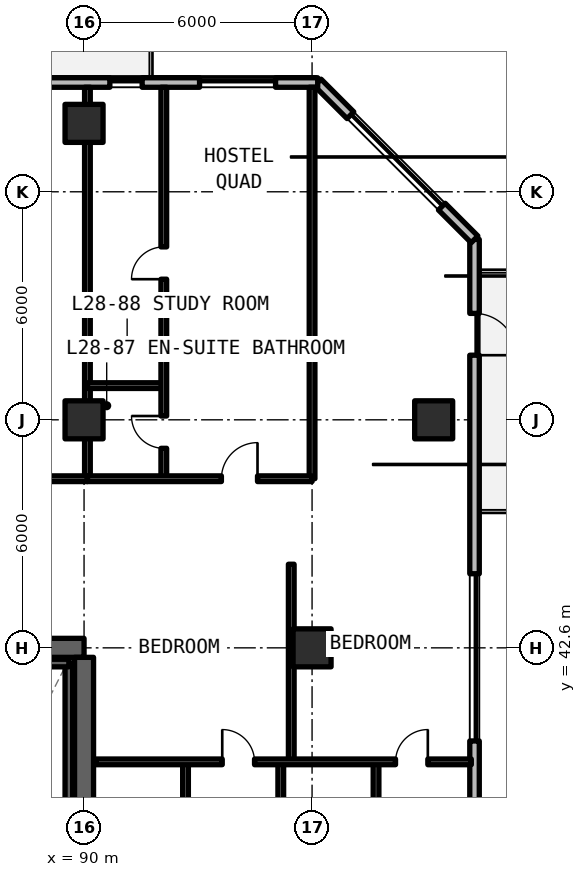
"""IFC4 building model, lengths in metres.
Left out: names, types, materials, properties, quantities, classifications, styles, units other than length and angle.
Written with IfcOpenShell. Run it as: python <this file> out.ifc"""

import sys

from ifc_helpers import new_model, si_unit, direction, frame, frame_2d, origin, origin_2d, place, context, subcontext, project, spatial, rectangle, extrude, element, fill, save


model = new_model("IFC4")
c1 = context("Model", 3, precision=1e-05, world=origin(), true_north=direction((0.0, 1.0)))
c2 = subcontext(c1, "Body", "Model", "MODEL_VIEW")
j1 = project(units=[si_unit("LENGTHUNIT", "METRE"), si_unit("PLANEANGLEUNIT", "RADIAN")], contexts=[c1])
p1 = place(None, origin())
s1 = spatial("IfcSite", under=j1, at=p1, CompositionType="ELEMENT")
p2 = place(p1, origin())
s2 = spatial("IfcBuilding", under=s1, at=p2, CompositionType="ELEMENT")
p3 = place(p2, frame((0.0, 0.0, 101.97)))
s3 = spatial("IfcBuildingStorey", under=s2, at=p3, CompositionType="ELEMENT", Elevation=101.97)
p4 = place(p3, frame((90.0, 42.6, 0.0), z_axis=(0.0, 0.0, 1.0), x_axis=(-1.0, 0.0, 0.0)))
e1 = element("IfcWall", 1, at=p4, inside=s3, PredefinedType="SHEAR", context=c2, shape_type="SweptSolid", body=[
    extrude(rectangle(XDim=12.0, YDim=0.5, at=frame_2d((6.0, 0.0))), origin(), (0.0, 0.0, 1.0), 3.3),
])
p5 = place(p3, frame((90.0, 24.85, 0.0), z_axis=(0.0, 0.0, 1.0), x_axis=(0.0, 1.0, 0.0)))
e2 = element("IfcWall", 2, at=p5, inside=s3, PredefinedType="SHEAR", context=c2, shape_type="SweptSolid", body=[
    extrude(rectangle(XDim=17.5, YDim=0.5, at=frame_2d((8.75, 0.0))), origin(), (0.0, 0.0, 1.0), 3.3),
])
for number, where, z_axis, x_axis in (
    (3, (96.0, 42.6, 0.0), (0.0, 0.0, 1.0), (1.0, 0.0, 0.0)),
    (4, (90.0, 48.6, 0.0), (0.0, 0.0, 1.0), (1.0, 0.0, 0.0)),
    (5, (99.2, 48.6, 0.0), (0.0, 0.0, 1.0), (1.0, 0.0, 0.0)),
    (6, (90.0, 56.4, 0.0), (0.0, 0.0, 1.0), (1.0, 0.0, 0.0)),
):
    element("IfcColumn", number, at=place(p3, frame(where, z_axis=z_axis, x_axis=x_axis)), inside=s3, PredefinedType="COLUMN", context=c2, shape_type="SweptSolid", body=[
        extrude(rectangle(XDim=1.0, YDim=1.0, at=origin_2d()), origin(), (0.0, 0.0, 1.0), 3.3),
    ])
p6 = place(p3, frame((100.275, 13.852, 0.0), z_axis=(0.0, 0.0, 1.0), x_axis=(0.0, 1.0, 0.0)))
e7 = element("IfcWall", 7, at=p6, inside=s3, PredefinedType="SOLIDWALL", context=c2, shape_type="SweptSolid", body=[
    extrude(rectangle(XDim=39.496, YDim=0.25, at=frame_2d((19.748, 0.0))), origin(), (0.0, 0.0, 1.0), 3.08),
])
p7 = place(p6, frame((1.948, 0.0, 0.0)))
e8 = element("IfcOpeningElement", 8, at=p7, cuts=e7, PredefinedType="OPENING", context=c2, shape_type="SweptSolid", body=[
    extrude(rectangle(XDim=1.1, YDim=2.15, at=frame_2d((0.55, 1.075))), frame((0.0, 0.135, 0.0), z_axis=(0.0, -1.0, 0.0), x_axis=(1.0, 0.0, 0.0)), (0.0, 0.0, 1.0), 0.27),
])
p8 = place(p6, frame((36.448, 0.0, 0.0)))
e9 = element("IfcOpeningElement", 9, at=p8, cuts=e7, PredefinedType="OPENING", context=c2, shape_type="SweptSolid", body=[
    extrude(rectangle(XDim=1.1, YDim=2.15, at=frame_2d((0.55, 1.075))), frame((0.0, 0.135, 0.0), z_axis=(0.0, -1.0, 0.0), x_axis=(1.0, 0.0, 0.0)), (0.0, 0.0, 1.0), 0.27),
])
p9 = place(p6, frame((14.958, 0.0, 0.78)))
e10 = element("IfcOpeningElement", 10, at=p9, cuts=e7, PredefinedType="OPENING", context=c2, shape_type="SweptSolid", body=[
    extrude(rectangle(XDim=4.4, YDim=1.66, at=frame_2d((2.2, 0.83))), frame((0.0, 0.135, 0.0), z_axis=(0.0, -1.0, 0.0), x_axis=(1.0, 0.0, 0.0)), (0.0, 0.0, 1.0), 0.27),
])
p10 = place(p6, frame((26.298, 0.0, 0.78)))
e11 = element("IfcOpeningElement", 11, at=p10, cuts=e7, PredefinedType="OPENING", context=c2, shape_type="SweptSolid", body=[
    extrude(rectangle(XDim=4.4, YDim=1.66, at=frame_2d((2.2, 0.83))), frame((0.0, 0.135, 0.0), z_axis=(0.0, -1.0, 0.0), x_axis=(1.0, 0.0, 0.0)), (0.0, 0.0, 1.0), 0.27),
])
p11 = place(p3, frame((100.275, 53.348, 0.0), z_axis=(0.0, 0.0, 1.0), x_axis=(-0.70708586489, 0.707127696864, 0.0)))
e12 = element("IfcWall", 12, at=p11, inside=s3, PredefinedType="SOLIDWALL", context=c2, shape_type="SweptSolid", body=[
    extrude(rectangle(XDim=5.836, YDim=0.25, at=frame_2d((2.918, 0.0))), origin(), (0.0, 0.0, 1.0), 3.08),
])
p12 = place(p11, frame((1.218, 0.0, 0.78)))
e13 = element("IfcOpeningElement", 13, at=p12, cuts=e12, PredefinedType="OPENING", context=c2, shape_type="SweptSolid", body=[
    extrude(rectangle(XDim=3.4, YDim=1.66, at=frame_2d((1.7, 0.83))), frame((0.0, 0.135, 0.0), z_axis=(0.0, -1.0, 0.0), x_axis=(1.0, 0.0, 0.0)), (0.0, 0.0, 1.0), 0.27),
])
p13 = place(p3, frame((96.148, 57.475, 0.0), z_axis=(0.0, 0.0, 1.0), x_axis=(-1.0, 0.0, 0.0)))
e14 = element("IfcWall", 14, at=p13, inside=s3, PredefinedType="SOLIDWALL", context=c2, shape_type="SweptSolid", body=[
    extrude(rectangle(XDim=44.023, YDim=0.25, at=frame_2d((22.012, 0.0))), origin(), (0.0, 0.0, 1.0), 3.08),
])
p14 = place(p13, frame((31.848, 0.0, 0.0)))
e15 = element("IfcOpeningElement", 15, at=p14, cuts=e14, PredefinedType="OPENING", context=c2, shape_type="SweptSolid", body=[
    extrude(rectangle(XDim=1.1, YDim=2.15, at=frame_2d((0.55, 1.075))), frame((0.0, 0.135, 0.0), z_axis=(0.0, -1.0, 0.0), x_axis=(1.0, 0.0, 0.0)), (0.0, 0.0, 1.0), 0.27),
])
p15 = place(p13, frame((19.998, 0.0, 0.0)))
e16 = element("IfcOpeningElement", 16, at=p15, cuts=e14, PredefinedType="OPENING", context=c2, shape_type="SweptSolid", body=[
    extrude(rectangle(XDim=1.1, YDim=2.15, at=frame_2d((0.55, 1.075))), frame((0.0, 0.135, 0.0), z_axis=(0.0, -1.0, 0.0), x_axis=(1.0, 0.0, 0.0)), (0.0, 0.0, 1.0), 0.27),
])
p16 = place(p13, frame((8.398, 0.0, 0.0)))
e17 = element("IfcOpeningElement", 17, at=p16, cuts=e14, PredefinedType="OPENING", context=c2, shape_type="SweptSolid", body=[
    extrude(rectangle(XDim=1.1, YDim=2.15, at=frame_2d((0.55, 1.075))), frame((0.0, 0.135, 0.0), z_axis=(0.0, -1.0, 0.0), x_axis=(1.0, 0.0, 0.0)), (0.0, 0.0, 1.0), 0.27),
])
p17 = place(p13, frame((39.277, 0.0, 0.78)))
e18 = element("IfcOpeningElement", 18, at=p17, cuts=e14, PredefinedType="OPENING", context=c2, shape_type="SweptSolid", body=[
    extrude(rectangle(XDim=2.0, YDim=1.66, at=frame_2d((1.0, 0.83))), frame((0.0, 0.135, 0.0), z_axis=(0.0, -1.0, 0.0), x_axis=(1.0, 0.0, 0.0)), (0.0, 0.0, 1.0), 0.27),
])
p18 = place(p13, frame((34.622, 0.0, 0.78)))
e19 = element("IfcOpeningElement", 19, at=p18, cuts=e14, PredefinedType="OPENING", context=c2, shape_type="SweptSolid", body=[
    extrude(rectangle(XDim=0.85, YDim=1.65, at=frame_2d((0.425, 0.825))), frame((0.0, 0.135, 0.0), z_axis=(0.0, -1.0, 0.0), x_axis=(1.0, 0.0, 0.0)), (0.0, 0.0, 1.0), 0.27),
])
p19 = place(p13, frame((26.431, 0.0, 0.78)))
e20 = element("IfcOpeningElement", 20, at=p19, cuts=e14, PredefinedType="OPENING", context=c2, shape_type="SweptSolid", body=[
    extrude(rectangle(XDim=2.0, YDim=1.66, at=frame_2d((1.0, 0.83))), frame((0.0, 0.135, 0.0), z_axis=(0.0, -1.0, 0.0), x_axis=(1.0, 0.0, 0.0)), (0.0, 0.0, 1.0), 0.27),
])
p20 = place(p13, frame((22.757, 0.0, 0.78)))
e21 = element("IfcOpeningElement", 21, at=p20, cuts=e14, PredefinedType="OPENING", context=c2, shape_type="SweptSolid", body=[
    extrude(rectangle(XDim=0.85, YDim=1.65, at=frame_2d((0.425, 0.825))), frame((0.0, 0.135, 0.0), z_axis=(0.0, -1.0, 0.0), x_axis=(1.0, 0.0, 0.0)), (0.0, 0.0, 1.0), 0.27),
])
p21 = place(p13, frame((16.669, 0.0, 0.78)))
e22 = element("IfcOpeningElement", 22, at=p21, cuts=e14, PredefinedType="OPENING", context=c2, shape_type="SweptSolid", body=[
    extrude(rectangle(XDim=0.85, YDim=1.65, at=frame_2d((0.425, 0.825))), frame((0.0, 0.135, 0.0), z_axis=(0.0, -1.0, 0.0), x_axis=(1.0, 0.0, 0.0)), (0.0, 0.0, 1.0), 0.27),
])
p22 = place(p13, frame((13.159, 0.0, 0.78)))
e23 = element("IfcOpeningElement", 23, at=p22, cuts=e14, PredefinedType="OPENING", context=c2, shape_type="SweptSolid", body=[
    extrude(rectangle(XDim=2.0, YDim=1.66, at=frame_2d((1.0, 0.83))), frame((0.0, 0.135, 0.0), z_axis=(0.0, -1.0, 0.0), x_axis=(1.0, 0.0, 0.0)), (0.0, 0.0, 1.0), 0.27),
])
p23 = place(p13, frame((10.56, 0.0, 0.78)))
e24 = element("IfcOpeningElement", 24, at=p23, cuts=e14, PredefinedType="OPENING", context=c2, shape_type="SweptSolid", body=[
    extrude(rectangle(XDim=0.85, YDim=1.65, at=frame_2d((0.425, 0.825))), frame((0.0, 0.135, 0.0), z_axis=(0.0, -1.0, 0.0), x_axis=(1.0, 0.0, 0.0)), (0.0, 0.0, 1.0), 0.27),
])
p24 = place(p13, frame((4.619, 0.0, 0.78)))
e25 = element("IfcOpeningElement", 25, at=p24, cuts=e14, PredefinedType="OPENING", context=c2, shape_type="SweptSolid", body=[
    extrude(rectangle(XDim=0.85, YDim=1.65, at=frame_2d((0.425, 0.825))), frame((0.0, 0.135, 0.0), z_axis=(0.0, -1.0, 0.0), x_axis=(1.0, 0.0, 0.0)), (0.0, 0.0, 1.0), 0.27),
])
p25 = place(p13, frame((1.109, 0.0, 0.78)))
e26 = element("IfcOpeningElement", 26, at=p25, cuts=e14, PredefinedType="OPENING", context=c2, shape_type="SweptSolid", body=[
    extrude(rectangle(XDim=2.0, YDim=1.66, at=frame_2d((1.0, 0.83))), frame((0.0, 0.135, 0.0), z_axis=(0.0, -1.0, 0.0), x_axis=(1.0, 0.0, 0.0)), (0.0, 0.0, 1.0), 0.27),
])
p26 = place(p3, frame((95.177, 22.4, 0.0), z_axis=(0.0, 0.0, 1.0), x_axis=(0.0, 1.0, 0.0)))
e27 = element("IfcWall", 27, at=p26, inside=s3, PredefinedType="PARTITIONING", context=c2, shape_type="SweptSolid", body=[
    extrude(rectangle(XDim=17.2, YDim=0.15, at=frame_2d((8.6, 0.0))), origin(), (0.0, 0.0, 1.0), 2.35),
])
p27 = place(p26, frame((8.175, 0.0, 0.0)))
e28 = element("IfcOpeningElement", 28, at=p27, cuts=e27, PredefinedType="OPENING", context=c2, shape_type="SweptSolid", body=[
    extrude(rectangle(XDim=0.85, YDim=2.1, at=frame_2d((0.425, 1.05))), frame((0.0, 0.085, 0.0), z_axis=(0.0, -1.0, 0.0), x_axis=(1.0, 0.0, 0.0)), (0.0, 0.0, 1.0), 0.17),
])
p28 = place(p3, frame((97.683, 22.4, 0.0), z_axis=(0.0, 0.0, 1.0), x_axis=(0.0, 1.0, 0.0)))
e29 = element("IfcWall", 29, at=p28, inside=s3, PredefinedType="PARTITIONING", context=c2, shape_type="SweptSolid", body=[
    extrude(rectangle(XDim=17.2, YDim=0.15, at=frame_2d((8.6, 0.0))), origin(), (0.0, 0.0, 1.0), 2.35),
])
p29 = place(p28, frame((8.175, 0.0, 0.0)))
e30 = element("IfcOpeningElement", 30, at=p29, cuts=e29, PredefinedType="OPENING", context=c2, shape_type="SweptSolid", body=[
    extrude(rectangle(XDim=0.85, YDim=2.1, at=frame_2d((0.425, 1.05))), frame((0.0, 0.085, 0.0), z_axis=(0.0, -1.0, 0.0), x_axis=(1.0, 0.0, 0.0)), (0.0, 0.0, 1.0), 0.17),
])
p30 = place(p3, frame((92.67, 22.4, 0.0), z_axis=(0.0, 0.0, 1.0), x_axis=(0.0, 1.0, 0.0)))
e31 = element("IfcWall", 31, at=p30, inside=s3, PredefinedType="PARTITIONING", context=c2, shape_type="SweptSolid", body=[
    extrude(rectangle(XDim=17.2, YDim=0.15, at=frame_2d((8.6, 0.0))), origin(), (0.0, 0.0, 1.0), 2.35),
])
p31 = place(p30, frame((4.649, 0.0, 0.0)))
e32 = element("IfcOpeningElement", 32, at=p31, cuts=e31, PredefinedType="OPENING", context=c2, shape_type="SweptSolid", body=[
    extrude(rectangle(XDim=0.85, YDim=2.1, at=frame_2d((0.425, 1.05))), frame((0.0, 0.085, 0.0), z_axis=(0.0, -1.0, 0.0), x_axis=(1.0, 0.0, 0.0)), (0.0, 0.0, 1.0), 0.17),
])
p32 = place(p30, frame((13.249, 0.0, 0.0)))
e33 = element("IfcOpeningElement", 33, at=p32, cuts=e31, PredefinedType="OPENING", context=c2, shape_type="SweptSolid", body=[
    extrude(rectangle(XDim=0.85, YDim=2.1, at=frame_2d((0.425, 1.05))), frame((0.0, 0.085, 0.0), z_axis=(0.0, -1.0, 0.0), x_axis=(1.0, 0.0, 0.0)), (0.0, 0.0, 1.0), 0.17),
])
p33 = place(p3, frame((95.452, 39.6, 0.0), z_axis=(0.0, 0.0, 1.0), x_axis=(0.0, 1.0, 0.0)))
e34 = element("IfcWall", 34, at=p33, inside=s3, PredefinedType="PARTITIONING", context=c2, shape_type="SweptSolid", body=[
    extrude(rectangle(XDim=5.2, YDim=0.15, at=frame_2d((2.6, 0.0))), origin(), (0.0, 0.0, 1.0), 2.35),
])
p34 = place(p3, frame((90.32, 39.6, 0.0), z_axis=(0.0, 0.0, 1.0), x_axis=(1.0, 0.0, 0.0)))
e35 = element("IfcWall", 35, at=p34, inside=s3, PredefinedType="PARTITIONING", context=c2, shape_type="SweptSolid", body=[
    extrude(rectangle(XDim=9.87, YDim=0.15, at=frame_2d((4.935, 0.0))), origin(), (0.0, 0.0, 1.0), 2.35),
])
p35 = place(p34, frame((3.316, 0.0, 0.0)))
e36 = element("IfcOpeningElement", 36, at=p35, cuts=e35, PredefinedType="OPENING", context=c2, shape_type="SweptSolid", body=[
    extrude(rectangle(XDim=0.85, YDim=2.1, at=frame_2d((0.425, 1.05))), frame((0.0, 0.085, 0.0), z_axis=(0.0, -1.0, 0.0), x_axis=(1.0, 0.0, 0.0)), (0.0, 0.0, 1.0), 0.17),
])
p36 = place(p34, frame((7.876, 0.0, 0.0)))
e37 = element("IfcOpeningElement", 37, at=p36, cuts=e35, PredefinedType="OPENING", context=c2, shape_type="SweptSolid", body=[
    extrude(rectangle(XDim=0.85, YDim=2.1, at=frame_2d((0.425, 1.05))), frame((0.0, 0.085, 0.0), z_axis=(0.0, -1.0, 0.0), x_axis=(1.0, 0.0, 0.0)), (0.0, 0.0, 1.0), 0.17),
])
for number, where, z_axis, x_axis in (
    (38, (96.0, 47.05, 0.0), (0.0, 0.0, 1.0), (0.0, 1.0, 0.0)),
    (39, (90.089, 47.05, 0.0), (0.0, 0.0, 1.0), (0.0, 1.0, 0.0)),
):
    element("IfcWall", number, at=place(p3, frame(where, z_axis=z_axis, x_axis=x_axis)), inside=s3, PredefinedType="SOLIDWALL", context=c2, shape_type="SweptSolid", body=[
        extrude(rectangle(XDim=10.3, YDim=0.15, at=frame_2d((5.15, 0.0))), origin(), (0.0, 0.0, 1.0), 2.35),
    ])
p37 = place(p3, frame((83.95, 47.05, 0.0), z_axis=(0.0, 0.0, 1.0), x_axis=(1.0, 0.0, 0.0)))
e40 = element("IfcWall", 40, at=p37, inside=s3, PredefinedType="SOLIDWALL", context=c2, shape_type="SweptSolid", body=[
    extrude(rectangle(XDim=6.139, YDim=0.15, at=frame_2d((3.069, 0.0))), origin(), (0.0, 0.0, 1.0), 2.35),
])
p38 = place(p37, frame((3.678, 0.0, 0.0)))
e41 = element("IfcOpeningElement", 41, at=p38, cuts=e40, PredefinedType="OPENING", context=c2, shape_type="SweptSolid", body=[
    extrude(rectangle(XDim=0.95, YDim=2.15, at=frame_2d((0.475, 1.075))), frame((0.0, 0.085, 0.0), z_axis=(0.0, -1.0, 0.0), x_axis=(1.0, 0.0, 0.0)), (0.0, 0.0, 1.0), 0.17),
])
p39 = place(p3, frame((90.089, 49.5, 0.0), z_axis=(0.0, 0.0, 1.0), x_axis=(1.0, 0.0, 0.0)))
e42 = element("IfcWall", 42, at=p39, inside=s3, PredefinedType="PARTITIONING", context=c2, shape_type="SweptSolid", body=[
    extrude(rectangle(XDim=2.01, YDim=0.15, at=frame_2d((1.005, 0.0))), origin(), (0.0, 0.0, 1.0), 2.35),
])
p40 = place(p3, frame((92.099, 47.05, 0.0), z_axis=(0.0, 0.0, 1.0), x_axis=(0.0, 1.0, 0.0)))
e43 = element("IfcWall", 43, at=p40, inside=s3, PredefinedType="PARTITIONING", context=c2, shape_type="SweptSolid", body=[
    extrude(rectangle(XDim=10.3, YDim=0.15, at=frame_2d((5.15, 0.0))), origin(), (0.0, 0.0, 1.0), 2.35),
])
p41 = place(p40, frame((0.8, 0.0, 0.0)))
e44 = element("IfcOpeningElement", 44, at=p41, cuts=e43, PredefinedType="OPENING", context=c2, shape_type="SweptSolid", body=[
    extrude(rectangle(XDim=0.85, YDim=2.1, at=frame_2d((0.425, 1.05))), frame((0.0, 0.085, 0.0), z_axis=(0.0, -1.0, 0.0), x_axis=(1.0, 0.0, 0.0)), (0.0, 0.0, 1.0), 0.17),
])
p42 = place(p40, frame((5.25, 0.0, 0.0)))
e45 = element("IfcOpeningElement", 45, at=p42, cuts=e43, PredefinedType="OPENING", context=c2, shape_type="SweptSolid", body=[
    extrude(rectangle(XDim=0.85, YDim=2.1, at=frame_2d((0.425, 1.05))), frame((0.0, 0.085, 0.0), z_axis=(0.0, -1.0, 0.0), x_axis=(1.0, 0.0, 0.0)), (0.0, 0.0, 1.0), 0.17),
])
p43 = place(p3, frame((90.089, 47.05, 0.0), z_axis=(0.0, 0.0, 1.0), x_axis=(1.0, 0.0, 0.0)))
e46 = element("IfcWall", 46, at=p43, inside=s3, PredefinedType="SOLIDWALL", context=c2, shape_type="SweptSolid", body=[
    extrude(rectangle(XDim=5.911, YDim=0.15, at=frame_2d((2.956, 0.0))), origin(), (0.0, 0.0, 1.0), 2.35),
])
p44 = place(p43, frame((3.525, 0.0, 0.0)))
e47 = element("IfcOpeningElement", 47, at=p44, cuts=e46, PredefinedType="OPENING", context=c2, shape_type="SweptSolid", body=[
    extrude(rectangle(XDim=0.95, YDim=2.15, at=frame_2d((0.475, 1.075))), frame((0.0, 0.085, 0.0), z_axis=(0.0, -1.0, 0.0), x_axis=(1.0, 0.0, 0.0)), (0.0, 0.0, 1.0), 0.17),
])
p45 = place(p3, frame((89.6, 34.2, 0.0), z_axis=(0.0, 0.0, 1.0), x_axis=(0.0, 1.0, 0.0)))
e48 = element("IfcWall", 48, at=p45, inside=s3, PredefinedType="SOLIDWALL", context=c2, shape_type="SweptSolid", body=[
    extrude(rectangle(XDim=8.0, YDim=0.2, at=frame_2d((4.0, 0.0))), origin(), (0.0, 0.0, 1.0), 3.3),
])
p46 = place(p3, frame((89.6, 42.2, 0.0), z_axis=(0.0, 0.0, 1.0), x_axis=(-1.0, 0.0, 0.0)))
e49 = element("IfcWall", 49, at=p46, inside=s3, PredefinedType="SOLIDWALL", context=c2, shape_type="SweptSolid", body=[
    extrude(rectangle(XDim=3.4, YDim=0.2, at=frame_2d((1.7, 0.0))), origin(), (0.0, 0.0, 1.0), 3.3),
])
p47 = place(p8, frame((1.1, 0.0, 0.0), z_axis=(0.0, 0.0, 1.0), x_axis=(-1.0, 0.0, 0.0)))
e50 = element("IfcDoor", 50, at=p47, inside=s3, OperationType="SINGLE_SWING_LEFT", PredefinedType="DOOR", context=c2, shape_type="SweptSolid", body=[
    extrude(rectangle(XDim=1.1, YDim=2.15, at=frame_2d((0.55, 1.075))), frame((0.0, 0.025, 0.0), z_axis=(0.0, -1.0, 0.0), x_axis=(1.0, 0.0, 0.0)), (0.0, 0.0, 1.0), 0.05),
])
fill(e9, e50)
p48 = place(p10, origin())
e51 = element("IfcWindow", 51, at=p48, inside=s3, PartitioningType="SINGLE_PANEL", PredefinedType="WINDOW", context=c2, shape_type="SweptSolid", body=[
    extrude(rectangle(XDim=4.4, YDim=1.66, at=frame_2d((2.2, 0.83))), frame((0.0, 0.03, 0.0), z_axis=(0.0, -1.0, 0.0), x_axis=(1.0, 0.0, 0.0)), (0.0, 0.0, 1.0), 0.06),
])
fill(e11, e51)
p49 = place(p12, origin())
e52 = element("IfcWindow", 52, at=p49, inside=s3, PartitioningType="SINGLE_PANEL", PredefinedType="WINDOW", context=c2, shape_type="SweptSolid", body=[
    extrude(rectangle(XDim=3.4, YDim=1.66, at=frame_2d((1.7, 0.83))), frame((0.0, 0.03, 0.0), z_axis=(0.0, -1.0, 0.0), x_axis=(1.0, 0.0, 0.0)), (0.0, 0.0, 1.0), 0.06),
])
fill(e13, e52)
p50 = place(p24, origin())
e53 = element("IfcWindow", 53, at=p50, inside=s3, PartitioningType="SINGLE_PANEL", PredefinedType="WINDOW", context=c2, shape_type="SweptSolid", body=[
    extrude(rectangle(XDim=0.85, YDim=1.65, at=frame_2d((0.425, 0.825))), frame((0.0, 0.03, 0.0), z_axis=(0.0, -1.0, 0.0), x_axis=(1.0, 0.0, 0.0)), (0.0, 0.0, 1.0), 0.06),
])
fill(e25, e53)
p51 = place(p25, origin())
e54 = element("IfcWindow", 54, at=p51, inside=s3, PartitioningType="SINGLE_PANEL", PredefinedType="WINDOW", context=c2, shape_type="SweptSolid", body=[
    extrude(rectangle(XDim=2.0, YDim=1.66, at=frame_2d((1.0, 0.83))), frame((0.0, 0.03, 0.0), z_axis=(0.0, -1.0, 0.0), x_axis=(1.0, 0.0, 0.0)), (0.0, 0.0, 1.0), 0.06),
])
fill(e26, e54)
p52 = place(p35, origin())
e55 = element("IfcDoor", 55, at=p52, inside=s3, OperationType="SINGLE_SWING_LEFT", PredefinedType="DOOR", context=c2, shape_type="SweptSolid", body=[
    extrude(rectangle(XDim=0.85, YDim=2.1, at=frame_2d((0.425, 1.05))), frame((0.0, 0.025, 0.0), z_axis=(0.0, -1.0, 0.0), x_axis=(1.0, 0.0, 0.0)), (0.0, 0.0, 1.0), 0.05),
])
fill(e36, e55)
p53 = place(p36, origin())
e56 = element("IfcDoor", 56, at=p53, inside=s3, OperationType="SINGLE_SWING_RIGHT", PredefinedType="DOOR", context=c2, shape_type="SweptSolid", body=[
    extrude(rectangle(XDim=0.85, YDim=2.1, at=frame_2d((0.425, 1.05))), frame((0.0, 0.025, 0.0), z_axis=(0.0, -1.0, 0.0), x_axis=(1.0, 0.0, 0.0)), (0.0, 0.0, 1.0), 0.05),
])
fill(e37, e56)
p54 = place(p41, origin())
e57 = element("IfcDoor", 57, at=p54, inside=s3, OperationType="SINGLE_SWING_RIGHT", PredefinedType="DOOR", context=c2, shape_type="SweptSolid", body=[
    extrude(rectangle(XDim=0.85, YDim=2.1, at=frame_2d((0.425, 1.05))), frame((0.0, 0.025, 0.0), z_axis=(0.0, -1.0, 0.0), x_axis=(1.0, 0.0, 0.0)), (0.0, 0.0, 1.0), 0.05),
])
fill(e44, e57)
p55 = place(p42, origin())
e58 = element("IfcDoor", 58, at=p55, inside=s3, OperationType="SINGLE_SWING_LEFT", PredefinedType="DOOR", context=c2, shape_type="SweptSolid", body=[
    extrude(rectangle(XDim=0.85, YDim=2.1, at=frame_2d((0.425, 1.05))), frame((0.0, 0.025, 0.0), z_axis=(0.0, -1.0, 0.0), x_axis=(1.0, 0.0, 0.0)), (0.0, 0.0, 1.0), 0.05),
])
fill(e45, e58)
p56 = place(p44, origin())
e59 = element("IfcDoor", 59, at=p56, inside=s3, OperationType="SINGLE_SWING_RIGHT", PredefinedType="DOOR", context=c2, shape_type="SweptSolid", body=[
    extrude(rectangle(XDim=0.95, YDim=2.15, at=frame_2d((0.475, 1.075))), frame((0.0, 0.025, 0.0), z_axis=(0.0, -1.0, 0.0), x_axis=(1.0, 0.0, 0.0)), (0.0, 0.0, 1.0), 0.05),
])
fill(e47, e59)
save(model, sys.argv[1])
